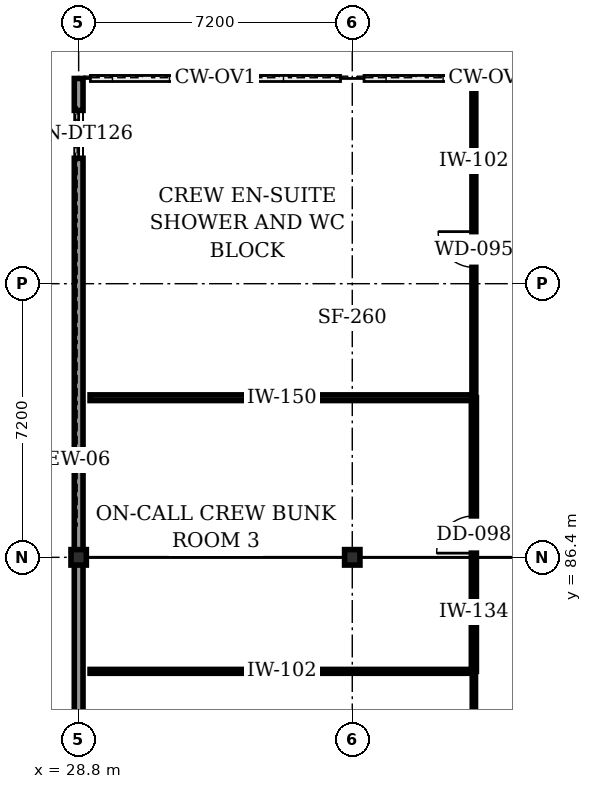
"""IFC4 building model, lengths in metres.
Left out: names, types, materials, properties, quantities, classifications, styles, units other than length and angle.
Written with IfcOpenShell. Run it as: python <this file> out.ifc"""

import sys

from ifc_helpers import new_model, si_unit, direction, frame, frame_2d, origin, origin_2d, place, context, subcontext, project, spatial, rectangle, i_section, extrude, element, fill, save


model = new_model("IFC4")
c1 = context("Model", 3, precision=1e-05, world=origin(), true_north=direction((0.0, 1.0)))
c2 = subcontext(c1, "Body", "Model", "MODEL_VIEW")
j1 = project(units=[si_unit("LENGTHUNIT", "METRE"), si_unit("PLANEANGLEUNIT", "RADIAN")], contexts=[c1])
p1 = place(None, origin())
s1 = spatial("IfcSite", under=j1, at=p1, CompositionType="ELEMENT")
p2 = place(p1, origin())
s2 = spatial("IfcBuilding", under=s1, at=p2, CompositionType="ELEMENT")
p3 = place(p2, frame((0.0, 0.0, 10.2)))
s3 = spatial("IfcBuildingStorey", under=s2, at=p3, CompositionType="ELEMENT", Elevation=10.2)
for number, where, z_axis, x_axis in (
    (1, (28.8, 86.4, 0.0), (0.0, 0.0, 1.0), (1.0, 0.0, 0.0)),
    (2, (36.0, 86.4, 0.0), (0.0, 0.0, 1.0), (1.0, 0.0, 0.0)),
):
    element("IfcColumn", number, at=place(p3, frame(where, z_axis=z_axis, x_axis=x_axis)), inside=s3, PredefinedType="COLUMN", context=c2, shape_type="SweptSolid", body=[
        extrude(i_section(OverallWidth=0.404, OverallDepth=0.407, WebThickness=0.027, FlangeThickness=0.044, at=origin_2d()), origin(), (0.0, 0.0, 1.0), 4.2),
    ])
p4 = place(p3, frame((28.8, 99.0, 0.0), z_axis=(0.0, 0.0, 1.0), x_axis=(0.0, -1.0, 0.0)))
e3 = element("IfcWall", 3, at=p4, inside=s3, PredefinedType="STANDARD", context=c2, shape_type="SweptSolid", body=[
    extrude(rectangle(XDim=41.4, YDim=0.23, at=frame_2d((20.7, 0.0))), origin(), (0.0, 0.0, 1.0), 3.0),
])
p5 = place(p4, frame((32.39, 0.0, 1.25)))
e4 = element("IfcOpeningElement", 4, at=p5, cuts=e3, PredefinedType="OPENING", context=c2, shape_type="SweptSolid", body=[
    extrude(rectangle(XDim=1.26, YDim=1.38, at=frame_2d((0.63, 0.69))), frame((0.0, 0.125, 0.0), z_axis=(0.0, -1.0, 0.0), x_axis=(1.0, 0.0, 0.0)), (0.0, 0.0, 1.0), 0.25),
])
p6 = place(p4, frame((25.19, 0.0, 1.25)))
e5 = element("IfcOpeningElement", 5, at=p6, cuts=e3, PredefinedType="OPENING", context=c2, shape_type="SweptSolid", body=[
    extrude(rectangle(XDim=1.26, YDim=1.38, at=frame_2d((0.63, 0.69))), frame((0.0, 0.125, 0.0), z_axis=(0.0, -1.0, 0.0), x_axis=(1.0, 0.0, 0.0)), (0.0, 0.0, 1.0), 0.25),
])
p7 = place(p4, frame((17.99, 0.0, 1.25)))
e6 = element("IfcOpeningElement", 6, at=p7, cuts=e3, PredefinedType="OPENING", context=c2, shape_type="SweptSolid", body=[
    extrude(rectangle(XDim=1.26, YDim=1.38, at=frame_2d((0.63, 0.69))), frame((0.0, 0.125, 0.0), z_axis=(0.0, -1.0, 0.0), x_axis=(1.0, 0.0, 0.0)), (0.0, 0.0, 1.0), 0.25),
])
p8 = place(p4, frame((0.84, 0.0, 1.25)))
e7 = element("IfcOpeningElement", 7, at=p8, cuts=e3, PredefinedType="OPENING", context=c2, shape_type="SweptSolid", body=[
    extrude(rectangle(XDim=1.26, YDim=1.38, at=frame_2d((0.63, 0.69))), frame((0.0, 0.125, 0.0), z_axis=(0.0, -1.0, 0.0), x_axis=(1.0, 0.0, 0.0)), (0.0, 0.0, 1.0), 0.25),
])
p9 = place(p3, frame((39.2, 83.4, 0.0), z_axis=(0.0, 0.0, 1.0), x_axis=(-1.0, 0.0, 0.0)))
e8 = element("IfcWall", 8, at=p9, inside=s3, PredefinedType="STANDARD", context=c2, shape_type="SweptSolid", body=[
    extrude(rectangle(XDim=10.1, YDim=0.102, at=frame_2d((5.05, 0.0))), origin(), (0.0, 0.0, 1.0), 3.038),
])
p10 = place(p3, frame((39.2, 76.2, 0.0), z_axis=(0.0, 0.0, 1.0), x_axis=(0.0, 1.0, 0.0)))
e9 = element("IfcWall", 9, at=p10, inside=s3, PredefinedType="STANDARD", context=c2, shape_type="SweptSolid", body=[
    extrude(rectangle(XDim=7.2, YDim=0.086, at=frame_2d((3.6, 0.0))), origin(), (0.0, 0.0, 1.0), 3.257),
])
p11 = place(p10, frame((3.1, 0.0, 0.0)))
e10 = element("IfcOpeningElement", 10, at=p11, cuts=e9, PredefinedType="OPENING", context=c2, shape_type="SweptSolid", body=[
    extrude(rectangle(XDim=1.0, YDim=2.18, at=frame_2d((0.5, 1.09))), frame((0.0, 0.053, 0.0), z_axis=(0.0, -1.0, 0.0), x_axis=(1.0, 0.0, 0.0)), (0.0, 0.0, 1.0), 0.106),
])
p12 = place(p3, frame((39.2, 90.6, 0.0), z_axis=(0.0, 0.0, 1.0), x_axis=(-1.0, 0.0, 0.0)))
e11 = element("IfcWall", 11, at=p12, inside=s3, PredefinedType="STANDARD", context=c2, shape_type="SweptSolid", body=[
    extrude(rectangle(XDim=10.1, YDim=0.15, at=frame_2d((5.05, 0.0))), origin(), (0.0, 0.0, 1.0), 3.038),
])
p13 = place(p3, frame((39.2, 83.4, 0.0), z_axis=(0.0, 0.0, 1.0), x_axis=(0.0, 1.0, 0.0)))
e12 = element("IfcWall", 12, at=p13, inside=s3, PredefinedType="STANDARD", context=c2, shape_type="SweptSolid", body=[
    extrude(rectangle(XDim=7.2, YDim=0.134, at=frame_2d((3.6, 0.0))), origin(), (0.0, 0.0, 1.0), 3.257),
])
p14 = place(p13, frame((3.11, 0.0, 0.0)))
e13 = element("IfcOpeningElement", 13, at=p14, cuts=e12, PredefinedType="OPENING", context=c2, shape_type="SweptSolid", body=[
    extrude(rectangle(XDim=0.98, YDim=2.16, at=frame_2d((0.49, 1.08))), frame((0.0, 0.077, 0.0), z_axis=(0.0, -1.0, 0.0), x_axis=(1.0, 0.0, 0.0)), (0.0, 0.0, 1.0), 0.154),
])
p15 = place(p3, frame((39.2, 90.6, 0.0), z_axis=(0.0, 0.0, 1.0), x_axis=(0.0, 1.0, 0.0)))
e14 = element("IfcWall", 14, at=p15, inside=s3, PredefinedType="STANDARD", context=c2, shape_type="SweptSolid", body=[
    extrude(rectangle(XDim=8.1, YDim=0.102, at=frame_2d((4.05, 0.0))), origin(), (0.0, 0.0, 1.0), 3.257),
])
p16 = place(p15, frame((3.43, 0.0, 0.0)))
e15 = element("IfcOpeningElement", 15, at=p16, cuts=e14, PredefinedType="OPENING", context=c2, shape_type="SweptSolid", body=[
    extrude(rectangle(XDim=0.94, YDim=2.12, at=frame_2d((0.47, 1.06))), frame((0.0, 0.061, 0.0), z_axis=(0.0, -1.0, 0.0), x_axis=(1.0, 0.0, 0.0)), (0.0, 0.0, 1.0), 0.122),
])
p17 = place(p8, origin())
e16 = element("IfcWindow", 16, at=p17, inside=s3, PartitioningType="SINGLE_PANEL", PredefinedType="WINDOW", context=c2, shape_type="SweptSolid", body=[
    extrude(rectangle(XDim=1.26, YDim=1.38, at=frame_2d((0.63, 0.69))), frame((0.0, 0.03, 0.0), z_axis=(0.0, -1.0, 0.0), x_axis=(1.0, 0.0, 0.0)), (0.0, 0.0, 1.0), 0.06),
])
fill(e7, e16)
p18 = place(p14, origin())
e17 = element("IfcDoor", 17, at=p18, inside=s3, OperationType="SINGLE_SWING_LEFT", PredefinedType="DOOR", context=c2, shape_type="SweptSolid", body=[
    extrude(rectangle(XDim=0.98, YDim=2.16, at=frame_2d((0.49, 1.08))), frame((0.0, 0.025, 0.0), z_axis=(0.0, -1.0, 0.0), x_axis=(1.0, 0.0, 0.0)), (0.0, 0.0, 1.0), 0.05),
])
fill(e13, e17)
p19 = place(p16, origin())
e18 = element("IfcDoor", 18, at=p19, inside=s3, OperationType="SINGLE_SWING_RIGHT", PredefinedType="DOOR", context=c2, shape_type="SweptSolid", body=[
    extrude(rectangle(XDim=0.94, YDim=2.12, at=frame_2d((0.47, 1.06))), frame((0.0, 0.025, 0.0), z_axis=(0.0, -1.0, 0.0), x_axis=(1.0, 0.0, 0.0)), (0.0, 0.0, 1.0), 0.05),
])
fill(e15, e18)
save(model, sys.argv[1])
